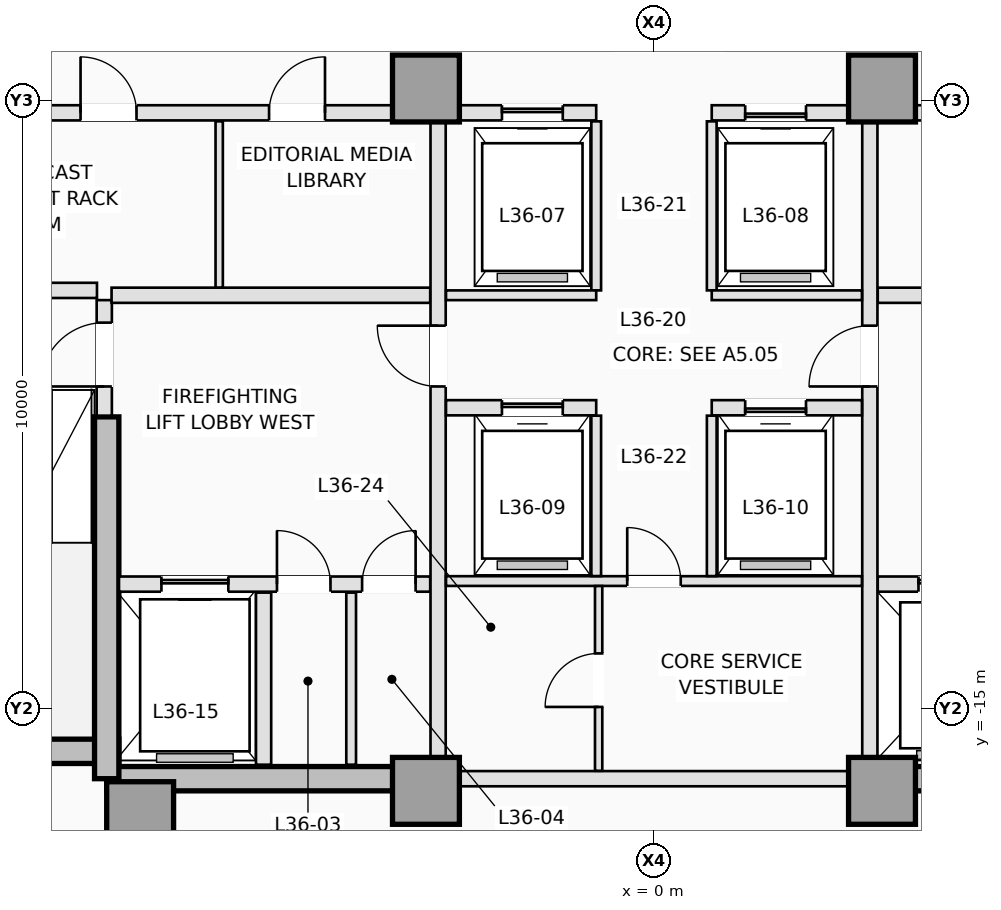
"""IFC4 building model, lengths in metres.
Left out: names, types, materials, properties, quantities, classifications, styles, units other than length and angle.
Written with IfcOpenShell. Run it as: python <this file> out.ifc"""

import sys

from ifc_helpers import new_model, si_unit, direction, frame, frame_2d, origin, origin_2d, place, context, subcontext, project, spatial, rectangle, extrude, element, fill, save


model = new_model("IFC4")
c1 = context("Model", 3, precision=1e-05, world=origin(), true_north=direction((0.0, 1.0)))
c2 = subcontext(c1, "Body", "Model", "MODEL_VIEW")
j1 = project(units=[si_unit("LENGTHUNIT", "METRE"), si_unit("PLANEANGLEUNIT", "RADIAN")], contexts=[c1])
p1 = place(None, origin())
s1 = spatial("IfcSite", under=j1, at=p1, CompositionType="ELEMENT")
p2 = place(p1, origin())
s2 = spatial("IfcBuilding", under=s1, at=p2, CompositionType="ELEMENT")
p3 = place(p2, frame((0.0, 0.0, 133.5)))
s3 = spatial("IfcBuildingStorey", under=s2, at=p3, CompositionType="ELEMENT", Elevation=133.5)
p4 = place(p3, frame((-12.6, -15.7, 0.0), z_axis=(0.0, 0.0, 1.0), x_axis=(1.0, 0.0, 0.0)))
e1 = element("IfcWall", 1, at=p4, inside=s3, PredefinedType="SHEAR", context=c2, shape_type="SweptSolid", body=[
    extrude(rectangle(XDim=3.8, YDim=0.4, at=frame_2d((1.9, 0.0))), origin(), (0.0, 0.0, 1.0), 3.5),
])
for number, where, z_axis, x_axis in (
    (2, (-9.0, -16.15, 0.0), (0.0, 0.0, 1.0), (1.0, 0.0, 0.0)),
    (3, (3.75, -16.15, 0.0), (0.0, 0.0, 1.0), (1.0, 0.0, 0.0)),
):
    element("IfcWall", number, at=place(p3, frame(where, z_axis=z_axis, x_axis=x_axis)), inside=s3, PredefinedType="SHEAR", context=c2, shape_type="SweptSolid", body=[
        extrude(rectangle(XDim=5.25, YDim=0.4, at=frame_2d((2.625, 0.0))), origin(), (0.0, 0.0, 1.0), 3.5),
    ])
p5 = place(p3, frame((-9.0, -16.15, 0.0), z_axis=(0.0, 0.0, 1.0), x_axis=(0.0, 1.0, 0.0)))
e4 = element("IfcWall", 4, at=p5, inside=s3, PredefinedType="SHEAR", context=c2, shape_type="SweptSolid", body=[
    extrude(rectangle(XDim=5.95, YDim=0.4, at=frame_2d((2.975, 0.0))), origin(), (0.0, 0.0, 1.0), 3.5),
])
for number, where, z_axis, x_axis in (
    (5, (-8.45, -16.75, 0.0), (0.0, 0.0, 1.0), (1.0, 0.0, 0.0)),
    (6, (-3.75, -16.35, 0.0), (0.0, 0.0, 1.0), (1.0, 0.0, 0.0)),
    (7, (3.75, -16.35, 0.0), (0.0, 0.0, 1.0), (1.0, 0.0, 0.0)),
    (8, (-3.75, -4.8, 0.0), (0.0, 0.0, 1.0), (1.0, 0.0, 0.0)),
    (9, (3.75, -4.8, 0.0), (0.0, 0.0, 1.0), (1.0, 0.0, 0.0)),
):
    element("IfcColumn", number, at=place(p3, frame(where, z_axis=z_axis, x_axis=x_axis)), inside=s3, PredefinedType="COLUMN", context=c2, shape_type="SweptSolid", body=[
        extrude(rectangle(XDim=1.1, YDim=1.1, at=origin_2d()), origin(), (0.0, 0.0, 1.0), 3.5),
    ])
p6 = place(p3, frame((-9.04, -10.18, 0.0), z_axis=(0.0, 0.0, 1.0), x_axis=(0.0, 1.0, 0.0)))
e10 = element("IfcWall", 10, at=p6, inside=s3, PredefinedType="PARTITIONING", context=c2, shape_type="SweptSolid", body=[
    extrude(rectangle(XDim=1.9, YDim=0.25, at=frame_2d((0.95, 0.0))), origin(), (0.0, 0.0, 1.0), 3.25),
])
p7 = place(p6, frame((0.48, 0.0, 0.0)))
e11 = element("IfcOpeningElement", 11, at=p7, cuts=e10, PredefinedType="OPENING", context=c2, shape_type="SweptSolid", body=[
    extrude(rectangle(XDim=1.05, YDim=2.15, at=frame_2d((0.525, 1.075))), frame((0.0, 0.135, 0.0), z_axis=(0.0, -1.0, 0.0), x_axis=(1.0, 0.0, 0.0)), (0.0, 0.0, 1.0), 0.27),
])
p8 = place(p3, frame((-12.38, -8.12, 0.0), z_axis=(0.0, 0.0, 1.0), x_axis=(1.0, 0.0, 0.0)))
e12 = element("IfcWall", 12, at=p8, inside=s3, PredefinedType="PARTITIONING", context=c2, shape_type="SweptSolid", body=[
    extrude(rectangle(XDim=3.22, YDim=0.25, at=frame_2d((1.61, 0.0))), origin(), (0.0, 0.0, 1.0), 3.25),
])
p9 = place(p3, frame((-8.798, -12.95, 0.0), z_axis=(0.0, 0.0, 1.0), x_axis=(1.0, 0.0, 0.0)))
e13 = element("IfcWall", 13, at=p9, inside=s3, PredefinedType="PARTITIONING", context=c2, shape_type="SweptSolid", body=[
    extrude(rectangle(XDim=5.118, YDim=0.25, at=frame_2d((2.559, 0.0))), origin(), (0.0, 0.0, 1.0), 3.25),
])
p10 = place(p9, frame((0.698, 0.0, 0.0)))
e14 = element("IfcOpeningElement", 14, at=p10, cuts=e13, PredefinedType="OPENING", context=c2, shape_type="SweptSolid", body=[
    extrude(rectangle(XDim=1.1, YDim=2.15, at=frame_2d((0.55, 1.075))), frame((0.0, 0.135, 0.0), z_axis=(0.0, -1.0, 0.0), x_axis=(1.0, 0.0, 0.0)), (0.0, 0.0, 1.0), 0.27),
])
p11 = place(p9, frame((2.598, 0.0, 0.0)))
e15 = element("IfcOpeningElement", 15, at=p11, cuts=e13, PredefinedType="OPENING", context=c2, shape_type="SweptSolid", body=[
    extrude(rectangle(XDim=0.88, YDim=2.1, at=frame_2d((0.44, 1.05))), frame((0.0, 0.135, 0.0), z_axis=(0.0, -1.0, 0.0), x_axis=(1.0, 0.0, 0.0)), (0.0, 0.0, 1.0), 0.27),
])
p12 = place(p9, frame((3.998, 0.0, 0.0)))
e16 = element("IfcOpeningElement", 16, at=p12, cuts=e13, PredefinedType="OPENING", context=c2, shape_type="SweptSolid", body=[
    extrude(rectangle(XDim=0.88, YDim=2.1, at=frame_2d((0.44, 1.05))), frame((0.0, 0.135, 0.0), z_axis=(0.0, -1.0, 0.0), x_axis=(1.0, 0.0, 0.0)), (0.0, 0.0, 1.0), 0.27),
])
p13 = place(p3, frame((3.68, -12.95, 0.0), z_axis=(0.0, 0.0, 1.0), x_axis=(1.0, 0.0, 0.0)))
e17 = element("IfcWall", 17, at=p13, inside=s3, PredefinedType="PARTITIONING", context=c2, shape_type="SweptSolid", body=[
    extrude(rectangle(XDim=5.118, YDim=0.25, at=frame_2d((2.559, 0.0))), origin(), (0.0, 0.0, 1.0), 3.25),
])
p14 = place(p13, frame((3.32, 0.0, 0.0)))
e18 = element("IfcOpeningElement", 18, at=p14, cuts=e17, PredefinedType="OPENING", context=c2, shape_type="SweptSolid", body=[
    extrude(rectangle(XDim=1.1, YDim=2.15, at=frame_2d((0.55, 1.075))), frame((0.0, 0.135, 0.0), z_axis=(0.0, -1.0, 0.0), x_axis=(1.0, 0.0, 0.0)), (0.0, 0.0, 1.0), 0.27),
])
p15 = place(p13, frame((0.67, 0.0, 0.0)))
e19 = element("IfcOpeningElement", 19, at=p15, cuts=e17, PredefinedType="OPENING", context=c2, shape_type="SweptSolid", body=[
    extrude(rectangle(XDim=1.2, YDim=2.15, at=frame_2d((0.6, 1.075))), frame((0.0, 0.135, 0.0), z_axis=(0.0, -1.0, 0.0), x_axis=(1.0, 0.0, 0.0)), (0.0, 0.0, 1.0), 0.27),
])
p16 = place(p3, frame((-6.42, -15.92, 0.0), z_axis=(0.0, 0.0, 1.0), x_axis=(0.0, 1.0, 0.0)))
e20 = element("IfcWall", 20, at=p16, inside=s3, PredefinedType="PARTITIONING", context=c2, shape_type="SweptSolid", body=[
    extrude(rectangle(XDim=2.83, YDim=0.25, at=frame_2d((1.415, 0.0))), origin(), (0.0, 0.0, 1.0), 3.25),
])
p17 = place(p3, frame((-4.98, -15.92, 0.0), z_axis=(0.0, 0.0, 1.0), x_axis=(0.0, 1.0, 0.0)))
e21 = element("IfcWall", 21, at=p17, inside=s3, PredefinedType="PARTITIONING", context=c2, shape_type="SweptSolid", body=[
    extrude(rectangle(XDim=2.83, YDim=0.16, at=frame_2d((1.415, 0.0))), origin(), (0.0, 0.0, 1.0), 3.25),
])
for number, where, z_axis, x_axis in (
    (22, (-8.92, -8.2, 0.0), (0.0, 0.0, 1.0), (1.0, 0.0, 0.0)),
    (23, (3.68, -8.2, 0.0), (0.0, 0.0, 1.0), (1.0, 0.0, 0.0)),
):
    element("IfcWall", number, at=place(p3, frame(where, z_axis=z_axis, x_axis=x_axis)), inside=s3, PredefinedType="PARTITIONING", context=c2, shape_type="SweptSolid", body=[
        extrude(rectangle(XDim=5.24, YDim=0.25, at=frame_2d((2.62, 0.0))), origin(), (0.0, 0.0, 1.0), 3.25),
    ])
p18 = place(p3, frame((-3.55, -15.798, 0.0), z_axis=(0.0, 0.0, 1.0), x_axis=(0.0, 1.0, 0.0)))
e24 = element("IfcWall", 24, at=p18, inside=s3, PredefinedType="PARTITIONING", context=c2, shape_type="SweptSolid", body=[
    extrude(rectangle(XDim=10.446, YDim=0.25, at=frame_2d((5.223, 0.0))), origin(), (0.0, 0.0, 1.0), 3.25),
])
p19 = place(p18, frame((6.098, 0.0, 0.0)))
e25 = element("IfcOpeningElement", 25, at=p19, cuts=e24, PredefinedType="OPENING", context=c2, shape_type="SweptSolid", body=[
    extrude(rectangle(XDim=1.0, YDim=2.15, at=frame_2d((0.5, 1.075))), frame((0.0, 0.135, 0.0), z_axis=(0.0, -1.0, 0.0), x_axis=(1.0, 0.0, 0.0)), (0.0, 0.0, 1.0), 0.27),
])
p20 = place(p3, frame((3.55, -15.798, 0.0), z_axis=(0.0, 0.0, 1.0), x_axis=(0.0, 1.0, 0.0)))
e26 = element("IfcWall", 26, at=p20, inside=s3, PredefinedType="PARTITIONING", context=c2, shape_type="SweptSolid", body=[
    extrude(rectangle(XDim=10.446, YDim=0.25, at=frame_2d((5.223, 0.0))), origin(), (0.0, 0.0, 1.0), 3.25),
])
p21 = place(p20, frame((6.098, 0.0, 0.0)))
e27 = element("IfcOpeningElement", 27, at=p21, cuts=e26, PredefinedType="OPENING", context=c2, shape_type="SweptSolid", body=[
    extrude(rectangle(XDim=1.0, YDim=2.15, at=frame_2d((0.5, 1.075))), frame((0.0, 0.135, 0.0), z_axis=(0.0, -1.0, 0.0), x_axis=(1.0, 0.0, 0.0)), (0.0, 0.0, 1.0), 0.27),
])
p22 = place(p3, frame((-12.398, -5.2, 0.0), z_axis=(0.0, 0.0, 1.0), x_axis=(1.0, 0.0, 0.0)))
e28 = element("IfcWall", 28, at=p22, inside=s3, PredefinedType="PARTITIONING", context=c2, shape_type="SweptSolid", body=[
    extrude(rectangle(XDim=8.096, YDim=0.25, at=frame_2d((4.048, 0.0))), origin(), (0.0, 0.0, 1.0), 3.25),
])
p23 = place(p22, frame((2.968, 0.0, 0.0)))
e29 = element("IfcOpeningElement", 29, at=p23, cuts=e28, PredefinedType="OPENING", context=c2, shape_type="SweptSolid", body=[
    extrude(rectangle(XDim=0.92, YDim=2.12, at=frame_2d((0.46, 1.06))), frame((0.0, 0.135, 0.0), z_axis=(0.0, -1.0, 0.0), x_axis=(1.0, 0.0, 0.0)), (0.0, 0.0, 1.0), 0.27),
])
p24 = place(p22, frame((6.068, 0.0, 0.0)))
e30 = element("IfcOpeningElement", 30, at=p24, cuts=e28, PredefinedType="OPENING", context=c2, shape_type="SweptSolid", body=[
    extrude(rectangle(XDim=0.92, YDim=2.12, at=frame_2d((0.46, 1.06))), frame((0.0, 0.135, 0.0), z_axis=(0.0, -1.0, 0.0), x_axis=(1.0, 0.0, 0.0)), (0.0, 0.0, 1.0), 0.27),
])
p25 = place(p3, frame((4.302, -5.2, 0.0), z_axis=(0.0, 0.0, 1.0), x_axis=(1.0, 0.0, 0.0)))
e31 = element("IfcWall", 31, at=p25, inside=s3, PredefinedType="PARTITIONING", context=c2, shape_type="SweptSolid", body=[
    extrude(rectangle(XDim=8.096, YDim=0.25, at=frame_2d((4.048, 0.0))), origin(), (0.0, 0.0, 1.0), 3.25),
])
p26 = place(p3, frame((-3.198, -5.2, 0.0), z_axis=(0.0, 0.0, 1.0), x_axis=(1.0, 0.0, 0.0)))
e32 = element("IfcWall", 32, at=p26, inside=s3, PredefinedType="PARTITIONING", context=c2, shape_type="SweptSolid", body=[
    extrude(rectangle(XDim=2.248, YDim=0.25, at=frame_2d((1.124, 0.0))), origin(), (0.0, 0.0, 1.0), 3.25),
])
p27 = place(p26, frame((0.698, 0.0, 0.0)))
e33 = element("IfcOpeningElement", 33, at=p27, cuts=e32, PredefinedType="OPENING", context=c2, shape_type="SweptSolid", body=[
    extrude(rectangle(XDim=1.0, YDim=2.15, at=frame_2d((0.5, 1.075))), frame((0.0, 0.135, 0.0), z_axis=(0.0, -1.0, 0.0), x_axis=(1.0, 0.0, 0.0)), (0.0, 0.0, 1.0), 0.27),
])
p28 = place(p3, frame((0.95, -5.2, 0.0), z_axis=(0.0, 0.0, 1.0), x_axis=(1.0, 0.0, 0.0)))
e34 = element("IfcWall", 34, at=p28, inside=s3, PredefinedType="PARTITIONING", context=c2, shape_type="SweptSolid", body=[
    extrude(rectangle(XDim=2.248, YDim=0.25, at=frame_2d((1.124, 0.0))), origin(), (0.0, 0.0, 1.0), 3.25),
])
p29 = place(p28, frame((0.55, 0.0, 0.0)))
e35 = element("IfcOpeningElement", 35, at=p29, cuts=e34, PredefinedType="OPENING", context=c2, shape_type="SweptSolid", body=[
    extrude(rectangle(XDim=1.0, YDim=2.15, at=frame_2d((0.5, 1.075))), frame((0.0, 0.135, 0.0), z_axis=(0.0, -1.0, 0.0), x_axis=(1.0, 0.0, 0.0)), (0.0, 0.0, 1.0), 0.27),
])
p30 = place(p3, frame((-7.15, -8.073, 0.0), z_axis=(0.0, 0.0, 1.0), x_axis=(0.0, 1.0, 0.0)))
e36 = element("IfcWall", 36, at=p30, inside=s3, PredefinedType="PARTITIONING", context=c2, shape_type="SweptSolid", body=[
    extrude(rectangle(XDim=2.733, YDim=0.12, at=frame_2d((1.366, 0.0))), origin(), (0.0, 0.0, 1.0), 3.25),
])
p31 = place(p3, frame((-3.198, -16.15, 0.0), z_axis=(0.0, 0.0, 1.0), x_axis=(1.0, 0.0, 0.0)))
e37 = element("IfcWall", 37, at=p31, inside=s3, PredefinedType="PARTITIONING", context=c2, shape_type="SweptSolid", body=[
    extrude(rectangle(XDim=6.396, YDim=0.25, at=frame_2d((3.198, 0.0))), origin(), (0.0, 0.0, 1.0), 2.45),
])
for number, where, z_axis, x_axis in (
    (38, (-0.95, -8.12, 0.0), (0.0, 0.0, 1.0), (0.0, 1.0, 0.0)),
    (39, (0.95, -8.12, 0.0), (0.0, 0.0, 1.0), (0.0, 1.0, 0.0)),
):
    element("IfcWall", number, at=place(p3, frame(where, z_axis=z_axis, x_axis=x_axis)), inside=s3, PredefinedType="PARTITIONING", context=c2, shape_type="SweptSolid", body=[
        extrude(rectangle(XDim=2.78, YDim=0.16, at=frame_2d((1.39, 0.0))), origin(), (0.0, 0.0, 1.0), 3.25),
    ])
for number, where, z_axis, x_axis in (
    (40, (-3.42, -8.2, 0.0), (0.0, 0.0, 1.0), (1.0, 0.0, 0.0)),
    (41, (0.95, -8.2, 0.0), (0.0, 0.0, 1.0), (1.0, 0.0, 0.0)),
):
    element("IfcWall", number, at=place(p3, frame(where, z_axis=z_axis, x_axis=x_axis)), inside=s3, PredefinedType="PARTITIONING", context=c2, shape_type="SweptSolid", body=[
        extrude(rectangle(XDim=2.47, YDim=0.16, at=frame_2d((1.235, 0.0))), origin(), (0.0, 0.0, 1.0), 3.25),
    ])
p32 = place(p3, frame((-3.42, -10.05, 0.0), z_axis=(0.0, 0.0, 1.0), x_axis=(1.0, 0.0, 0.0)))
e42 = element("IfcWall", 42, at=p32, inside=s3, PredefinedType="PARTITIONING", context=c2, shape_type="SweptSolid", body=[
    extrude(rectangle(XDim=2.47, YDim=0.25, at=frame_2d((1.235, 0.0))), origin(), (0.0, 0.0, 1.0), 3.25),
])
p33 = place(p32, frame((0.92, 0.0, 0.0)))
e43 = element("IfcOpeningElement", 43, at=p33, cuts=e42, PredefinedType="OPENING", context=c2, shape_type="SweptSolid", body=[
    extrude(rectangle(XDim=1.0, YDim=2.15, at=frame_2d((0.5, 1.075))), frame((0.0, 0.135, 0.0), z_axis=(0.0, -1.0, 0.0), x_axis=(1.0, 0.0, 0.0)), (0.0, 0.0, 1.0), 0.27),
])
p34 = place(p3, frame((0.95, -10.05, 0.0), z_axis=(0.0, 0.0, 1.0), x_axis=(1.0, 0.0, 0.0)))
e44 = element("IfcWall", 44, at=p34, inside=s3, PredefinedType="PARTITIONING", context=c2, shape_type="SweptSolid", body=[
    extrude(rectangle(XDim=2.47, YDim=0.25, at=frame_2d((1.235, 0.0))), origin(), (0.0, 0.0, 1.0), 3.25),
])
p35 = place(p34, frame((0.55, 0.0, 0.0)))
e45 = element("IfcOpeningElement", 45, at=p35, cuts=e44, PredefinedType="OPENING", context=c2, shape_type="SweptSolid", body=[
    extrude(rectangle(XDim=1.0, YDim=2.15, at=frame_2d((0.5, 1.075))), frame((0.0, 0.135, 0.0), z_axis=(0.0, -1.0, 0.0), x_axis=(1.0, 0.0, 0.0)), (0.0, 0.0, 1.0), 0.27),
])
p36 = place(p3, frame((-3.42, -12.9, 0.0), z_axis=(0.0, 0.0, 1.0), x_axis=(1.0, 0.0, 0.0)))
e46 = element("IfcWall", 46, at=p36, inside=s3, PredefinedType="PARTITIONING", context=c2, shape_type="SweptSolid", body=[
    extrude(rectangle(XDim=6.84, YDim=0.16, at=frame_2d((3.42, 0.0))), origin(), (0.0, 0.0, 1.0), 3.25),
])
p37 = place(p36, frame((2.98, 0.0, 0.0)))
e47 = element("IfcOpeningElement", 47, at=p37, cuts=e46, PredefinedType="OPENING", context=c2, shape_type="SweptSolid", body=[
    extrude(rectangle(XDim=0.88, YDim=2.12, at=frame_2d((0.44, 1.06))), frame((0.0, 0.09, 0.0), z_axis=(0.0, -1.0, 0.0), x_axis=(1.0, 0.0, 0.0)), (0.0, 0.0, 1.0), 0.18),
])
for number, where, z_axis, x_axis in (
    (48, (-0.95, -12.818, 0.0), (0.0, 0.0, 1.0), (0.0, 1.0, 0.0)),
    (49, (0.95, -12.818, 0.0), (0.0, 0.0, 1.0), (0.0, 1.0, 0.0)),
):
    element("IfcWall", number, at=place(p3, frame(where, z_axis=z_axis, x_axis=x_axis)), inside=s3, PredefinedType="PARTITIONING", context=c2, shape_type="SweptSolid", body=[
        extrude(rectangle(XDim=2.638, YDim=0.16, at=frame_2d((1.319, 0.0))), origin(), (0.0, 0.0, 1.0), 3.25),
    ])
p38 = place(p3, frame((-0.91, -16.02, 0.0), z_axis=(0.0, 0.0, 1.0), x_axis=(0.0, 1.0, 0.0)))
e50 = element("IfcWall", 50, at=p38, inside=s3, PredefinedType="PARTITIONING", context=c2, shape_type="SweptSolid", body=[
    extrude(rectangle(XDim=3.038, YDim=0.12, at=frame_2d((1.519, 0.0))), origin(), (0.0, 0.0, 1.0), 3.25),
])
p39 = place(p38, frame((1.05, 0.0, 0.0)))
e51 = element("IfcOpeningElement", 51, at=p39, cuts=e50, PredefinedType="OPENING", context=c2, shape_type="SweptSolid", body=[
    extrude(rectangle(XDim=0.88, YDim=2.12, at=frame_2d((0.44, 1.06))), frame((0.0, 0.07, 0.0), z_axis=(0.0, -1.0, 0.0), x_axis=(1.0, 0.0, 0.0)), (0.0, 0.0, 1.0), 0.14),
])
p40 = place(p27, origin())
e52 = element("IfcDoor", 52, at=p40, inside=s3, OperationType="SLIDING_TO_LEFT", PredefinedType="DOOR", context=c2, shape_type="SweptSolid", body=[
    extrude(rectangle(XDim=1.0, YDim=2.15, at=frame_2d((0.5, 1.075))), frame((0.0, 0.025, 0.0), z_axis=(0.0, -1.0, 0.0), x_axis=(1.0, 0.0, 0.0)), (0.0, 0.0, 1.0), 0.05),
])
fill(e33, e52)
p41 = place(p29, origin())
e53 = element("IfcDoor", 53, at=p41, inside=s3, OperationType="SLIDING_TO_RIGHT", PredefinedType="DOOR", context=c2, shape_type="SweptSolid", body=[
    extrude(rectangle(XDim=1.0, YDim=2.15, at=frame_2d((0.5, 1.075))), frame((0.0, 0.025, 0.0), z_axis=(0.0, -1.0, 0.0), x_axis=(1.0, 0.0, 0.0)), (0.0, 0.0, 1.0), 0.05),
])
fill(e35, e53)
p42 = place(p10, origin())
e54 = element("IfcDoor", 54, at=p42, inside=s3, OperationType="SLIDING_TO_LEFT", PredefinedType="DOOR", context=c2, shape_type="SweptSolid", body=[
    extrude(rectangle(XDim=1.1, YDim=2.15, at=frame_2d((0.55, 1.075))), frame((0.0, 0.025, 0.0), z_axis=(0.0, -1.0, 0.0), x_axis=(1.0, 0.0, 0.0)), (0.0, 0.0, 1.0), 0.05),
])
fill(e14, e54)
p43 = place(p15, origin())
e55 = element("IfcDoor", 55, at=p43, inside=s3, OperationType="SLIDING_TO_LEFT", PredefinedType="DOOR", context=c2, shape_type="SweptSolid", body=[
    extrude(rectangle(XDim=1.2, YDim=2.15, at=frame_2d((0.6, 1.075))), frame((0.0, 0.025, 0.0), z_axis=(0.0, -1.0, 0.0), x_axis=(1.0, 0.0, 0.0)), (0.0, 0.0, 1.0), 0.05),
])
fill(e19, e55)
p44 = place(p33, origin())
e56 = element("IfcDoor", 56, at=p44, inside=s3, OperationType="SLIDING_TO_LEFT", PredefinedType="DOOR", context=c2, shape_type="SweptSolid", body=[
    extrude(rectangle(XDim=1.0, YDim=2.15, at=frame_2d((0.5, 1.075))), frame((0.0, 0.025, 0.0), z_axis=(0.0, -1.0, 0.0), x_axis=(1.0, 0.0, 0.0)), (0.0, 0.0, 1.0), 0.05),
])
fill(e43, e56)
p45 = place(p35, origin())
e57 = element("IfcDoor", 57, at=p45, inside=s3, OperationType="SLIDING_TO_RIGHT", PredefinedType="DOOR", context=c2, shape_type="SweptSolid", body=[
    extrude(rectangle(XDim=1.0, YDim=2.15, at=frame_2d((0.5, 1.075))), frame((0.0, 0.025, 0.0), z_axis=(0.0, -1.0, 0.0), x_axis=(1.0, 0.0, 0.0)), (0.0, 0.0, 1.0), 0.05),
])
fill(e45, e57)
p46 = place(p7, origin())
e58 = element("IfcDoor", 58, at=p46, inside=s3, OperationType="SINGLE_SWING_LEFT", PredefinedType="DOOR", context=c2, shape_type="SweptSolid", body=[
    extrude(rectangle(XDim=1.05, YDim=2.15, at=frame_2d((0.525, 1.075))), frame((0.0, 0.025, 0.0), z_axis=(0.0, -1.0, 0.0), x_axis=(1.0, 0.0, 0.0)), (0.0, 0.0, 1.0), 0.05),
])
fill(e11, e58)
p47 = place(p11, origin())
e59 = element("IfcDoor", 59, at=p47, inside=s3, OperationType="SINGLE_SWING_LEFT", PredefinedType="TRAPDOOR", context=c2, shape_type="SweptSolid", body=[
    extrude(rectangle(XDim=0.88, YDim=2.1, at=frame_2d((0.44, 1.05))), frame((0.0, 0.025, 0.0), z_axis=(0.0, -1.0, 0.0), x_axis=(1.0, 0.0, 0.0)), (0.0, 0.0, 1.0), 0.05),
])
fill(e15, e59)
p48 = place(p12, origin())
e60 = element("IfcDoor", 60, at=p48, inside=s3, OperationType="SINGLE_SWING_RIGHT", PredefinedType="TRAPDOOR", context=c2, shape_type="SweptSolid", body=[
    extrude(rectangle(XDim=0.88, YDim=2.1, at=frame_2d((0.44, 1.05))), frame((0.0, 0.025, 0.0), z_axis=(0.0, -1.0, 0.0), x_axis=(1.0, 0.0, 0.0)), (0.0, 0.0, 1.0), 0.05),
])
fill(e16, e60)
p49 = place(p19, origin())
e61 = element("IfcDoor", 61, at=p49, inside=s3, OperationType="SINGLE_SWING_RIGHT", PredefinedType="DOOR", context=c2, shape_type="SweptSolid", body=[
    extrude(rectangle(XDim=1.0, YDim=2.15, at=frame_2d((0.5, 1.075))), frame((0.0, 0.025, 0.0), z_axis=(0.0, -1.0, 0.0), x_axis=(1.0, 0.0, 0.0)), (0.0, 0.0, 1.0), 0.05),
])
fill(e25, e61)
p50 = place(p21, origin())
e62 = element("IfcDoor", 62, at=p50, inside=s3, OperationType="SINGLE_SWING_LEFT", PredefinedType="DOOR", context=c2, shape_type="SweptSolid", body=[
    extrude(rectangle(XDim=1.0, YDim=2.15, at=frame_2d((0.5, 1.075))), frame((0.0, 0.025, 0.0), z_axis=(0.0, -1.0, 0.0), x_axis=(1.0, 0.0, 0.0)), (0.0, 0.0, 1.0), 0.05),
])
fill(e27, e62)
p51 = place(p23, origin())
e63 = element("IfcDoor", 63, at=p51, inside=s3, OperationType="SINGLE_SWING_LEFT", PredefinedType="DOOR", context=c2, shape_type="SweptSolid", body=[
    extrude(rectangle(XDim=0.92, YDim=2.12, at=frame_2d((0.46, 1.06))), frame((0.0, 0.025, 0.0), z_axis=(0.0, -1.0, 0.0), x_axis=(1.0, 0.0, 0.0)), (0.0, 0.0, 1.0), 0.05),
])
fill(e29, e63)
p52 = place(p24, origin())
e64 = element("IfcDoor", 64, at=p52, inside=s3, OperationType="SINGLE_SWING_RIGHT", PredefinedType="DOOR", context=c2, shape_type="SweptSolid", body=[
    extrude(rectangle(XDim=0.92, YDim=2.12, at=frame_2d((0.46, 1.06))), frame((0.0, 0.025, 0.0), z_axis=(0.0, -1.0, 0.0), x_axis=(1.0, 0.0, 0.0)), (0.0, 0.0, 1.0), 0.05),
])
fill(e30, e64)
p53 = place(p37, origin())
e65 = element("IfcDoor", 65, at=p53, inside=s3, OperationType="SINGLE_SWING_LEFT", PredefinedType="DOOR", context=c2, shape_type="SweptSolid", body=[
    extrude(rectangle(XDim=0.88, YDim=2.12, at=frame_2d((0.44, 1.06))), frame((0.0, 0.025, 0.0), z_axis=(0.0, -1.0, 0.0), x_axis=(1.0, 0.0, 0.0)), (0.0, 0.0, 1.0), 0.05),
])
fill(e47, e65)
p54 = place(p39, origin())
e66 = element("IfcDoor", 66, at=p54, inside=s3, OperationType="SINGLE_SWING_LEFT", PredefinedType="DOOR", context=c2, shape_type="SweptSolid", body=[
    extrude(rectangle(XDim=0.88, YDim=2.12, at=frame_2d((0.44, 1.06))), frame((0.0, 0.025, 0.0), z_axis=(0.0, -1.0, 0.0), x_axis=(1.0, 0.0, 0.0)), (0.0, 0.0, 1.0), 0.05),
])
fill(e51, e66)
save(model, sys.argv[1])
